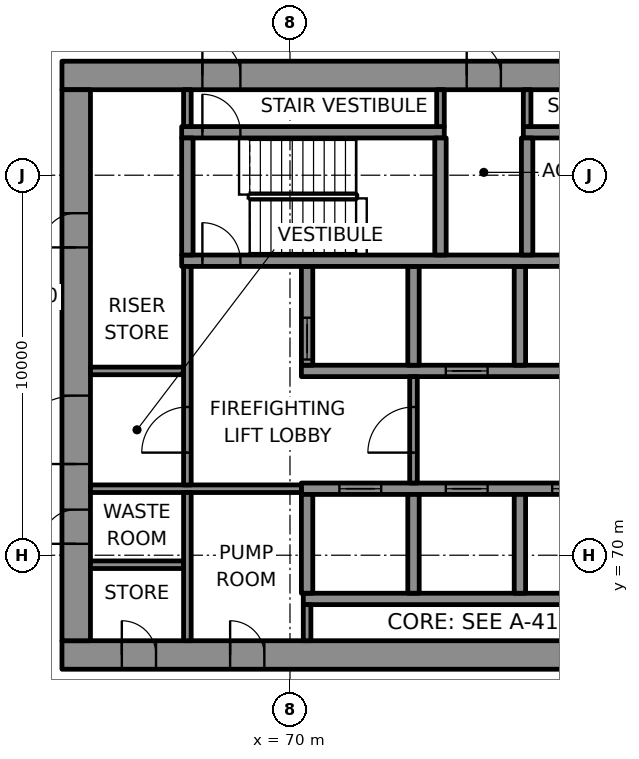
"""IFC4 building model, lengths in metres.
Left out: names, types, materials, properties, quantities, classifications, styles, units other than length and angle.
Written with IfcOpenShell. Run it as: python <this file> out.ifc"""

import sys

from ifc_helpers import new_model, si_unit, direction, frame, frame_2d, origin, place, context, subcontext, project, spatial, rectangle, extrude, element, fill, save


model = new_model("IFC4")
c1 = context("Model", 3, precision=1e-05, world=origin(), true_north=direction((0.0, 1.0)))
c2 = subcontext(c1, "Body", "Model", "MODEL_VIEW")
j1 = project(units=[si_unit("LENGTHUNIT", "METRE"), si_unit("PLANEANGLEUNIT", "RADIAN")], contexts=[c1])
p1 = place(None, origin())
s1 = spatial("IfcSite", under=j1, at=p1, CompositionType="ELEMENT")
p2 = place(p1, origin())
s2 = spatial("IfcBuilding", under=s1, at=p2, CompositionType="ELEMENT")
p3 = place(p2, frame((0.0, 0.0, 206.5)))
s3 = spatial("IfcBuildingStorey", under=s2, at=p3, CompositionType="ELEMENT", Elevation=206.5)
p4 = place(p3, frame((64.0, 67.375, 0.0), z_axis=(0.0, 0.0, 1.0), x_axis=(1.0, 0.0, 0.0)))
e1 = element("IfcWall", 1, at=p4, inside=s3, PredefinedType="SHEAR", context=c2, shape_type="SweptSolid", body=[
    extrude(rectangle(XDim=22.0, YDim=0.75, at=frame_2d((11.0, 0.0))), origin(), (0.0, 0.0, 1.0), 3.7),
])
p5 = place(p4, frame((1.575, 0.0, 0.0)))
e2 = element("IfcOpeningElement", 2, at=p5, cuts=e1, PredefinedType="OPENING", context=c2, shape_type="SweptSolid", body=[
    extrude(rectangle(XDim=0.9, YDim=2.1, at=frame_2d((0.45, 1.05))), frame((0.0, 0.385, 0.0), z_axis=(0.0, -1.0, 0.0), x_axis=(1.0, 0.0, 0.0)), (0.0, 0.0, 1.0), 0.77),
])
p6 = place(p4, frame((4.425, 0.0, 0.0)))
e3 = element("IfcOpeningElement", 3, at=p6, cuts=e1, PredefinedType="OPENING", context=c2, shape_type="SweptSolid", body=[
    extrude(rectangle(XDim=0.9, YDim=2.1, at=frame_2d((0.45, 1.05))), frame((0.0, 0.385, 0.0), z_axis=(0.0, -1.0, 0.0), x_axis=(1.0, 0.0, 0.0)), (0.0, 0.0, 1.0), 0.77),
])
p7 = place(p3, frame((64.0, 82.625, 0.0), z_axis=(0.0, 0.0, 1.0), x_axis=(1.0, 0.0, 0.0)))
e4 = element("IfcWall", 4, at=p7, inside=s3, PredefinedType="SHEAR", context=c2, shape_type="SweptSolid", body=[
    extrude(rectangle(XDim=22.0, YDim=0.75, at=frame_2d((11.0, 0.0))), origin(), (0.0, 0.0, 1.0), 3.7),
])
p8 = place(p7, frame((3.695, 0.0, 0.0)))
e5 = element("IfcOpeningElement", 5, at=p8, cuts=e4, PredefinedType="OPENING", context=c2, shape_type="SweptSolid", body=[
    extrude(rectangle(XDim=1.0, YDim=2.1, at=frame_2d((0.5, 1.05))), frame((0.0, 0.385, 0.0), z_axis=(0.0, -1.0, 0.0), x_axis=(1.0, 0.0, 0.0)), (0.0, 0.0, 1.0), 0.77),
])
p9 = place(p7, frame((17.505, 0.0, 0.0)))
e6 = element("IfcOpeningElement", 6, at=p9, cuts=e4, PredefinedType="OPENING", context=c2, shape_type="SweptSolid", body=[
    extrude(rectangle(XDim=1.0, YDim=2.1, at=frame_2d((0.5, 1.05))), frame((0.0, 0.385, 0.0), z_axis=(0.0, -1.0, 0.0), x_axis=(1.0, 0.0, 0.0)), (0.0, 0.0, 1.0), 0.77),
])
p10 = place(p7, frame((10.65, 0.0, 0.0)))
e7 = element("IfcOpeningElement", 7, at=p10, cuts=e4, PredefinedType="OPENING", context=c2, shape_type="SweptSolid", body=[
    extrude(rectangle(XDim=0.9, YDim=2.1, at=frame_2d((0.45, 1.05))), frame((0.0, 0.385, 0.0), z_axis=(0.0, -1.0, 0.0), x_axis=(1.0, 0.0, 0.0)), (0.0, 0.0, 1.0), 0.77),
])
p11 = place(p3, frame((64.375, 67.75, 0.0), z_axis=(0.0, 0.0, 1.0), x_axis=(0.0, 1.0, 0.0)))
e8 = element("IfcWall", 8, at=p11, inside=s3, PredefinedType="SHEAR", context=c2, shape_type="SweptSolid", body=[
    extrude(rectangle(XDim=14.5, YDim=0.75, at=frame_2d((7.25, 0.0))), origin(), (0.0, 0.0, 1.0), 3.7),
])
p12 = place(p11, frame((4.65, 0.0, 0.0)))
e9 = element("IfcOpeningElement", 9, at=p12, cuts=e8, PredefinedType="OPENING", context=c2, shape_type="SweptSolid", body=[
    extrude(rectangle(XDim=1.8, YDim=2.1, at=frame_2d((0.9, 1.05))), frame((0.0, 0.385, 0.0), z_axis=(0.0, -1.0, 0.0), x_axis=(1.0, 0.0, 0.0)), (0.0, 0.0, 1.0), 0.77),
])
p13 = place(p11, frame((2.55, 0.0, 0.0)))
e10 = element("IfcOpeningElement", 10, at=p13, cuts=e8, PredefinedType="OPENING", context=c2, shape_type="SweptSolid", body=[
    extrude(rectangle(XDim=0.9, YDim=2.1, at=frame_2d((0.45, 1.05))), frame((0.0, 0.385, 0.0), z_axis=(0.0, -1.0, 0.0), x_axis=(1.0, 0.0, 0.0)), (0.0, 0.0, 1.0), 0.77),
])
p14 = place(p11, frame((10.35, 0.0, 0.0)))
e11 = element("IfcOpeningElement", 11, at=p14, cuts=e8, PredefinedType="OPENING", context=c2, shape_type="SweptSolid", body=[
    extrude(rectangle(XDim=0.9, YDim=2.1, at=frame_2d((0.45, 1.05))), frame((0.0, 0.385, 0.0), z_axis=(0.0, -1.0, 0.0), x_axis=(1.0, 0.0, 0.0)), (0.0, 0.0, 1.0), 0.77),
])
p15 = place(p3, frame((70.35, 68.85, 0.0), z_axis=(0.0, 0.0, 1.0), x_axis=(1.0, 0.0, 0.0)))
e12 = element("IfcWall", 12, at=p15, inside=s3, PredefinedType="SHEAR", context=c2, shape_type="SweptSolid", body=[
    extrude(rectangle(XDim=14.2, YDim=0.3, at=frame_2d((7.1, 0.0))), origin(), (0.0, 0.0, 1.0), 3.7),
])
p16 = place(p3, frame((70.3, 71.75, 0.0), z_axis=(0.0, 0.0, 1.0), x_axis=(1.0, 0.0, 0.0)))
e13 = element("IfcWall", 13, at=p16, inside=s3, PredefinedType="SHEAR", context=c2, shape_type="SweptSolid", body=[
    extrude(rectangle(XDim=14.3, YDim=0.3, at=frame_2d((7.15, 0.0))), origin(), (0.0, 0.0, 1.0), 3.7),
])
p17 = place(p16, frame((1.0, 0.0, 0.0)))
e14 = element("IfcOpeningElement", 14, at=p17, cuts=e13, PredefinedType="OPENING", context=c2, shape_type="SweptSolid", body=[
    extrude(rectangle(XDim=1.1, YDim=2.1, at=frame_2d((0.55, 1.05))), frame((0.0, 0.16, 0.0), z_axis=(0.0, -1.0, 0.0), x_axis=(1.0, 0.0, 0.0)), (0.0, 0.0, 1.0), 0.32),
])
p18 = place(p16, frame((3.8, 0.0, 0.0)))
e15 = element("IfcOpeningElement", 15, at=p18, cuts=e13, PredefinedType="OPENING", context=c2, shape_type="SweptSolid", body=[
    extrude(rectangle(XDim=1.1, YDim=2.1, at=frame_2d((0.55, 1.05))), frame((0.0, 0.16, 0.0), z_axis=(0.0, -1.0, 0.0), x_axis=(1.0, 0.0, 0.0)), (0.0, 0.0, 1.0), 0.32),
])
p19 = place(p16, frame((6.6, 0.0, 0.0)))
e16 = element("IfcOpeningElement", 16, at=p19, cuts=e13, PredefinedType="OPENING", context=c2, shape_type="SweptSolid", body=[
    extrude(rectangle(XDim=1.1, YDim=2.1, at=frame_2d((0.55, 1.05))), frame((0.0, 0.16, 0.0), z_axis=(0.0, -1.0, 0.0), x_axis=(1.0, 0.0, 0.0)), (0.0, 0.0, 1.0), 0.32),
])
p20 = place(p16, frame((9.4, 0.0, 0.0)))
e17 = element("IfcOpeningElement", 17, at=p20, cuts=e13, PredefinedType="OPENING", context=c2, shape_type="SweptSolid", body=[
    extrude(rectangle(XDim=1.1, YDim=2.1, at=frame_2d((0.55, 1.05))), frame((0.0, 0.16, 0.0), z_axis=(0.0, -1.0, 0.0), x_axis=(1.0, 0.0, 0.0)), (0.0, 0.0, 1.0), 0.32),
])
p21 = place(p16, frame((12.2, 0.0, 0.0)))
e18 = element("IfcOpeningElement", 18, at=p21, cuts=e13, PredefinedType="OPENING", context=c2, shape_type="SweptSolid", body=[
    extrude(rectangle(XDim=1.1, YDim=2.1, at=frame_2d((0.55, 1.05))), frame((0.0, 0.16, 0.0), z_axis=(0.0, -1.0, 0.0), x_axis=(1.0, 0.0, 0.0)), (0.0, 0.0, 1.0), 0.32),
])
p22 = place(p3, frame((70.3, 74.85, 0.0), z_axis=(0.0, 0.0, 1.0), x_axis=(1.0, 0.0, 0.0)))
e19 = element("IfcWall", 19, at=p22, inside=s3, PredefinedType="SHEAR", context=c2, shape_type="SweptSolid", body=[
    extrude(rectangle(XDim=14.3, YDim=0.3, at=frame_2d((7.15, 0.0))), origin(), (0.0, 0.0, 1.0), 3.7),
])
p23 = place(p22, frame((3.8, 0.0, 0.0)))
e20 = element("IfcOpeningElement", 20, at=p23, cuts=e19, PredefinedType="OPENING", context=c2, shape_type="SweptSolid", body=[
    extrude(rectangle(XDim=1.1, YDim=2.1, at=frame_2d((0.55, 1.05))), frame((0.0, 0.16, 0.0), z_axis=(0.0, -1.0, 0.0), x_axis=(1.0, 0.0, 0.0)), (0.0, 0.0, 1.0), 0.32),
])
p24 = place(p22, frame((12.2, 0.0, 0.0)))
e21 = element("IfcOpeningElement", 21, at=p24, cuts=e19, PredefinedType="OPENING", context=c2, shape_type="SweptSolid", body=[
    extrude(rectangle(XDim=1.1, YDim=2.1, at=frame_2d((0.55, 1.05))), frame((0.0, 0.16, 0.0), z_axis=(0.0, -1.0, 0.0), x_axis=(1.0, 0.0, 0.0)), (0.0, 0.0, 1.0), 0.32),
])
p25 = place(p3, frame((70.45, 69.0, 0.0), z_axis=(0.0, 0.0, 1.0), x_axis=(0.0, 1.0, 0.0)))
e22 = element("IfcWall", 22, at=p25, inside=s3, PredefinedType="SHEAR", context=c2, shape_type="SweptSolid", body=[
    extrude(rectangle(XDim=2.6, YDim=0.3, at=frame_2d((1.3, 0.0))), origin(), (0.0, 0.0, 1.0), 3.7),
])
p26 = place(p3, frame((70.45, 75.0, 0.0), z_axis=(0.0, 0.0, 1.0), x_axis=(0.0, 1.0, 0.0)))
e23 = element("IfcWall", 23, at=p26, inside=s3, PredefinedType="SHEAR", context=c2, shape_type="SweptSolid", body=[
    extrude(rectangle(XDim=2.6, YDim=0.3, at=frame_2d((1.3, 0.0))), origin(), (0.0, 0.0, 1.0), 3.7),
])
p27 = place(p26, frame((0.15, 0.0, 0.0)))
e24 = element("IfcOpeningElement", 24, at=p27, cuts=e23, PredefinedType="OPENING", context=c2, shape_type="SweptSolid", body=[
    extrude(rectangle(XDim=1.1, YDim=2.1, at=frame_2d((0.55, 1.05))), frame((0.0, 0.16, 0.0), z_axis=(0.0, -1.0, 0.0), x_axis=(1.0, 0.0, 0.0)), (0.0, 0.0, 1.0), 0.32),
])
for number, where, z_axis, x_axis in (
    (25, (73.25, 69.0, 0.0), (0.0, 0.0, 1.0), (0.0, 1.0, 0.0)),
    (26, (73.25, 75.0, 0.0), (0.0, 0.0, 1.0), (0.0, 1.0, 0.0)),
    (27, (76.05, 69.0, 0.0), (0.0, 0.0, 1.0), (0.0, 1.0, 0.0)),
    (28, (76.05, 75.0, 0.0), (0.0, 0.0, 1.0), (0.0, 1.0, 0.0)),
):
    element("IfcWall", number, at=place(p3, frame(where, z_axis=z_axis, x_axis=x_axis)), inside=s3, PredefinedType="SHEAR", context=c2, shape_type="SweptSolid", body=[
        extrude(rectangle(XDim=2.6, YDim=0.3, at=frame_2d((1.3, 0.0))), origin(), (0.0, 0.0, 1.0), 3.7),
    ])
p28 = place(p3, frame((67.15, 77.75, 0.0), z_axis=(0.0, 0.0, 1.0), x_axis=(1.0, 0.0, 0.0)))
e29 = element("IfcWall", 29, at=p28, inside=s3, PredefinedType="SHEAR", context=c2, shape_type="SweptSolid", body=[
    extrude(rectangle(XDim=17.45, YDim=0.3, at=frame_2d((8.725, 0.0))), origin(), (0.0, 0.0, 1.0), 3.7),
])
p29 = place(p28, frame((0.545, 0.0, 0.0)))
e30 = element("IfcOpeningElement", 30, at=p29, cuts=e29, PredefinedType="OPENING", context=c2, shape_type="SweptSolid", body=[
    extrude(rectangle(XDim=1.0, YDim=2.1, at=frame_2d((0.5, 1.05))), frame((0.0, 0.16, 0.0), z_axis=(0.0, -1.0, 0.0), x_axis=(1.0, 0.0, 0.0)), (0.0, 0.0, 1.0), 0.32),
])
p30 = place(p3, frame((67.15, 81.13, 0.0), z_axis=(0.0, 0.0, 1.0), x_axis=(1.0, 0.0, 0.0)))
e31 = element("IfcWall", 31, at=p30, inside=s3, PredefinedType="SHEAR", context=c2, shape_type="SweptSolid", body=[
    extrude(rectangle(XDim=6.91, YDim=0.3, at=frame_2d((3.455, 0.0))), origin(), (0.0, 0.0, 1.0), 3.7),
])
p31 = place(p30, frame((0.545, 0.0, 0.0)))
e32 = element("IfcOpeningElement", 32, at=p31, cuts=e31, PredefinedType="OPENING", context=c2, shape_type="SweptSolid", body=[
    extrude(rectangle(XDim=1.0, YDim=2.1, at=frame_2d((0.5, 1.05))), frame((0.0, 0.16, 0.0), z_axis=(0.0, -1.0, 0.0), x_axis=(1.0, 0.0, 0.0)), (0.0, 0.0, 1.0), 0.32),
])
p32 = place(p3, frame((76.14, 81.13, 0.0), z_axis=(0.0, 0.0, 1.0), x_axis=(1.0, 0.0, 0.0)))
e33 = element("IfcWall", 33, at=p32, inside=s3, PredefinedType="SHEAR", context=c2, shape_type="SweptSolid", body=[
    extrude(rectangle(XDim=6.86, YDim=0.3, at=frame_2d((3.43, 0.0))), origin(), (0.0, 0.0, 1.0), 3.7),
])
p33 = place(p32, frame((5.365, 0.0, 0.0)))
e34 = element("IfcOpeningElement", 34, at=p33, cuts=e33, PredefinedType="OPENING", context=c2, shape_type="SweptSolid", body=[
    extrude(rectangle(XDim=1.0, YDim=2.1, at=frame_2d((0.5, 1.05))), frame((0.0, 0.16, 0.0), z_axis=(0.0, -1.0, 0.0), x_axis=(1.0, 0.0, 0.0)), (0.0, 0.0, 1.0), 0.32),
])
for number, where, z_axis, x_axis in (
    (35, (67.3, 77.9, 0.0), (0.0, 0.0, 1.0), (0.0, 1.0, 0.0)),
    (36, (73.96, 77.9, 0.0), (0.0, 0.0, 1.0), (0.0, 1.0, 0.0)),
    (37, (76.24, 77.9, 0.0), (0.0, 0.0, 1.0), (0.0, 1.0, 0.0)),
):
    element("IfcWall", number, at=place(p3, frame(where, z_axis=z_axis, x_axis=x_axis)), inside=s3, PredefinedType="SHEAR", context=c2, shape_type="SweptSolid", body=[
        extrude(rectangle(XDim=3.08, YDim=0.3, at=frame_2d((1.54, 0.0))), origin(), (0.0, 0.0, 1.0), 3.7),
    ])
p34 = place(p3, frame((64.75, 69.75, 0.0), z_axis=(0.0, 0.0, 1.0), x_axis=(1.0, 0.0, 0.0)))
e38 = element("IfcWall", 38, at=p34, inside=s3, PredefinedType="PARTITIONING", context=c2, shape_type="SweptSolid", body=[
    extrude(rectangle(XDim=2.45, YDim=0.2, at=frame_2d((1.225, 0.0))), origin(), (0.0, 0.0, 1.0), 3.7),
])
p35 = place(p3, frame((64.75, 71.75, 0.0), z_axis=(0.0, 0.0, 1.0), x_axis=(1.0, 0.0, 0.0)))
e39 = element("IfcWall", 39, at=p35, inside=s3, PredefinedType="PARTITIONING", context=c2, shape_type="SweptSolid", body=[
    extrude(rectangle(XDim=5.55, YDim=0.2, at=frame_2d((2.775, 0.0))), origin(), (0.0, 0.0, 1.0), 3.7),
])
p36 = place(p3, frame((64.75, 74.85, 0.0), z_axis=(0.0, 0.0, 1.0), x_axis=(1.0, 0.0, 0.0)))
e40 = element("IfcWall", 40, at=p36, inside=s3, PredefinedType="PARTITIONING", context=c2, shape_type="SweptSolid", body=[
    extrude(rectangle(XDim=2.45, YDim=0.2, at=frame_2d((1.225, 0.0))), origin(), (0.0, 0.0, 1.0), 3.7),
])
p37 = place(p3, frame((67.3, 67.75, 0.0), z_axis=(0.0, 0.0, 1.0), x_axis=(0.0, 1.0, 0.0)))
e41 = element("IfcWall", 41, at=p37, inside=s3, PredefinedType="PARTITIONING", context=c2, shape_type="SweptSolid", body=[
    extrude(rectangle(XDim=3.9, YDim=0.2, at=frame_2d((1.95, 0.0))), origin(), (0.0, 0.0, 1.0), 3.7),
])
p38 = place(p3, frame((67.3, 71.85, 0.0), z_axis=(0.0, 0.0, 1.0), x_axis=(0.0, 1.0, 0.0)))
e42 = element("IfcWall", 42, at=p38, inside=s3, PredefinedType="PARTITIONING", context=c2, shape_type="SweptSolid", body=[
    extrude(rectangle(XDim=5.75, YDim=0.2, at=frame_2d((2.875, 0.0))), origin(), (0.0, 0.0, 1.0), 3.7),
])
p39 = place(p38, frame((0.85, 0.0, 0.0)))
e43 = element("IfcOpeningElement", 43, at=p39, cuts=e42, PredefinedType="OPENING", context=c2, shape_type="SweptSolid", body=[
    extrude(rectangle(XDim=1.2, YDim=2.1, at=frame_2d((0.6, 1.05))), frame((0.0, 0.11, 0.0), z_axis=(0.0, -1.0, 0.0), x_axis=(1.0, 0.0, 0.0)), (0.0, 0.0, 1.0), 0.22),
])
p40 = place(p3, frame((67.3, 81.28, 0.0), z_axis=(0.0, 0.0, 1.0), x_axis=(0.0, 1.0, 0.0)))
e44 = element("IfcWall", 44, at=p40, inside=s3, PredefinedType="PARTITIONING", context=c2, shape_type="SweptSolid", body=[
    extrude(rectangle(XDim=0.97, YDim=0.2, at=frame_2d((0.485, 0.0))), origin(), (0.0, 0.0, 1.0), 3.7),
])
p41 = place(p3, frame((70.45, 67.75, 0.0), z_axis=(0.0, 0.0, 1.0), x_axis=(0.0, 1.0, 0.0)))
e45 = element("IfcWall", 45, at=p41, inside=s3, PredefinedType="PARTITIONING", context=c2, shape_type="SweptSolid", body=[
    extrude(rectangle(XDim=0.95, YDim=0.2, at=frame_2d((0.475, 0.0))), origin(), (0.0, 0.0, 1.0), 3.7),
])
p42 = place(p3, frame((73.25, 71.9, 0.0), z_axis=(0.0, 0.0, 1.0), x_axis=(0.0, 1.0, 0.0)))
e46 = element("IfcWall", 46, at=p42, inside=s3, PredefinedType="PARTITIONING", context=c2, shape_type="SweptSolid", body=[
    extrude(rectangle(XDim=2.8, YDim=0.2, at=frame_2d((1.4, 0.0))), origin(), (0.0, 0.0, 1.0), 3.7),
])
p43 = place(p42, frame((0.8, 0.0, 0.0)))
e47 = element("IfcOpeningElement", 47, at=p43, cuts=e46, PredefinedType="OPENING", context=c2, shape_type="SweptSolid", body=[
    extrude(rectangle(XDim=1.2, YDim=2.1, at=frame_2d((0.6, 1.05))), frame((0.0, 0.11, 0.0), z_axis=(0.0, -1.0, 0.0), x_axis=(1.0, 0.0, 0.0)), (0.0, 0.0, 1.0), 0.22),
])
for number, where, z_axis, x_axis in (
    (48, (73.96, 81.28, 0.0), (0.0, 0.0, 1.0), (0.0, 1.0, 0.0)),
    (49, (76.24, 81.28, 0.0), (0.0, 0.0, 1.0), (0.0, 1.0, 0.0)),
):
    element("IfcWall", number, at=place(p3, frame(where, z_axis=z_axis, x_axis=x_axis)), inside=s3, PredefinedType="PARTITIONING", context=c2, shape_type="SweptSolid", body=[
        extrude(rectangle(XDim=0.97, YDim=0.2, at=frame_2d((0.485, 0.0))), origin(), (0.0, 0.0, 1.0), 3.7),
    ])
p44 = place(p17, origin())
e50 = element("IfcDoor", 50, at=p44, inside=s3, OperationType="DOUBLE_DOOR_SLIDING", PredefinedType="DOOR", context=c2, shape_type="SweptSolid", body=[
    extrude(rectangle(XDim=1.1, YDim=2.1, at=frame_2d((0.55, 1.05))), frame((0.0, 0.025, 0.0), z_axis=(0.0, -1.0, 0.0), x_axis=(1.0, 0.0, 0.0)), (0.0, 0.0, 1.0), 0.05),
])
fill(e14, e50)
p45 = place(p18, origin())
e51 = element("IfcDoor", 51, at=p45, inside=s3, OperationType="DOUBLE_DOOR_SLIDING", PredefinedType="DOOR", context=c2, shape_type="SweptSolid", body=[
    extrude(rectangle(XDim=1.1, YDim=2.1, at=frame_2d((0.55, 1.05))), frame((0.0, 0.025, 0.0), z_axis=(0.0, -1.0, 0.0), x_axis=(1.0, 0.0, 0.0)), (0.0, 0.0, 1.0), 0.05),
])
fill(e15, e51)
p46 = place(p19, origin())
e52 = element("IfcDoor", 52, at=p46, inside=s3, OperationType="DOUBLE_DOOR_SLIDING", PredefinedType="DOOR", context=c2, shape_type="SweptSolid", body=[
    extrude(rectangle(XDim=1.1, YDim=2.1, at=frame_2d((0.55, 1.05))), frame((0.0, 0.025, 0.0), z_axis=(0.0, -1.0, 0.0), x_axis=(1.0, 0.0, 0.0)), (0.0, 0.0, 1.0), 0.05),
])
fill(e16, e52)
p47 = place(p27, origin())
e53 = element("IfcDoor", 53, at=p47, inside=s3, OperationType="DOUBLE_DOOR_SLIDING", PredefinedType="DOOR", context=c2, shape_type="SweptSolid", body=[
    extrude(rectangle(XDim=1.1, YDim=2.1, at=frame_2d((0.55, 1.05))), frame((0.0, 0.025, 0.0), z_axis=(0.0, -1.0, 0.0), x_axis=(1.0, 0.0, 0.0)), (0.0, 0.0, 1.0), 0.05),
])
fill(e24, e53)
p48 = place(p23, origin())
e54 = element("IfcDoor", 54, at=p48, inside=s3, OperationType="DOUBLE_DOOR_SLIDING", PredefinedType="DOOR", context=c2, shape_type="SweptSolid", body=[
    extrude(rectangle(XDim=1.1, YDim=2.1, at=frame_2d((0.55, 1.05))), frame((0.0, 0.025, 0.0), z_axis=(0.0, -1.0, 0.0), x_axis=(1.0, 0.0, 0.0)), (0.0, 0.0, 1.0), 0.05),
])
fill(e20, e54)
p49 = place(p29, origin())
e55 = element("IfcDoor", 55, at=p49, inside=s3, OperationType="SINGLE_SWING_LEFT", PredefinedType="DOOR", context=c2, shape_type="SweptSolid", body=[
    extrude(rectangle(XDim=1.0, YDim=2.1, at=frame_2d((0.5, 1.05))), frame((0.0, 0.025, 0.0), z_axis=(0.0, -1.0, 0.0), x_axis=(1.0, 0.0, 0.0)), (0.0, 0.0, 1.0), 0.05),
])
fill(e30, e55)
p50 = place(p31, origin())
e56 = element("IfcDoor", 56, at=p50, inside=s3, OperationType="SINGLE_SWING_RIGHT", PredefinedType="DOOR", context=c2, shape_type="SweptSolid", body=[
    extrude(rectangle(XDim=1.0, YDim=2.1, at=frame_2d((0.5, 1.05))), frame((0.0, 0.025, 0.0), z_axis=(0.0, -1.0, 0.0), x_axis=(1.0, 0.0, 0.0)), (0.0, 0.0, 1.0), 0.05),
])
fill(e32, e56)
p51 = place(p8, origin())
e57 = element("IfcDoor", 57, at=p51, inside=s3, OperationType="SINGLE_SWING_LEFT", PredefinedType="DOOR", context=c2, shape_type="SweptSolid", body=[
    extrude(rectangle(XDim=1.0, YDim=2.1, at=frame_2d((0.5, 1.05))), frame((0.0, 0.095, 0.0), z_axis=(0.0, -1.0, 0.0), x_axis=(1.0, 0.0, 0.0)), (0.0, 0.0, 1.0), 0.19),
])
fill(e5, e57)
p52 = place(p43, origin())
e58 = element("IfcDoor", 58, at=p52, inside=s3, OperationType="SINGLE_SWING_LEFT", PredefinedType="DOOR", context=c2, shape_type="SweptSolid", body=[
    extrude(rectangle(XDim=1.2, YDim=2.1, at=frame_2d((0.6, 1.05))), frame((0.0, 0.025, 0.0), z_axis=(0.0, -1.0, 0.0), x_axis=(1.0, 0.0, 0.0)), (0.0, 0.0, 1.0), 0.05),
])
fill(e47, e58)
p53 = place(p39, origin())
e59 = element("IfcDoor", 59, at=p53, inside=s3, OperationType="SINGLE_SWING_RIGHT", PredefinedType="DOOR", context=c2, shape_type="SweptSolid", body=[
    extrude(rectangle(XDim=1.2, YDim=2.1, at=frame_2d((0.6, 1.05))), frame((0.0, 0.025, 0.0), z_axis=(0.0, -1.0, 0.0), x_axis=(1.0, 0.0, 0.0)), (0.0, 0.0, 1.0), 0.05),
])
fill(e43, e59)
p54 = place(p12, origin())
e60 = element("IfcDoor", 60, at=p54, inside=s3, OperationType="SINGLE_SWING_LEFT", PredefinedType="DOOR", context=c2, shape_type="SweptSolid", body=[
    extrude(rectangle(XDim=1.8, YDim=2.1, at=frame_2d((0.9, 1.05))), frame((0.0, 0.095, 0.0), z_axis=(0.0, -1.0, 0.0), x_axis=(1.0, 0.0, 0.0)), (0.0, 0.0, 1.0), 0.19),
])
fill(e9, e60)
p55 = place(p5, origin())
e61 = element("IfcDoor", 61, at=p55, inside=s3, OperationType="SINGLE_SWING_LEFT", PredefinedType="DOOR", context=c2, shape_type="SweptSolid", body=[
    extrude(rectangle(XDim=0.9, YDim=2.1, at=frame_2d((0.45, 1.05))), frame((0.0, 0.095, 0.0), z_axis=(0.0, -1.0, 0.0), x_axis=(1.0, 0.0, 0.0)), (0.0, 0.0, 1.0), 0.19),
])
fill(e2, e61)
p56 = place(p13, origin())
e62 = element("IfcDoor", 62, at=p56, inside=s3, OperationType="SINGLE_SWING_RIGHT", PredefinedType="DOOR", context=c2, shape_type="SweptSolid", body=[
    extrude(rectangle(XDim=0.9, YDim=2.1, at=frame_2d((0.45, 1.05))), frame((0.0, 0.095, 0.0), z_axis=(0.0, -1.0, 0.0), x_axis=(1.0, 0.0, 0.0)), (0.0, 0.0, 1.0), 0.19),
])
fill(e10, e62)
p57 = place(p6, origin())
e63 = element("IfcDoor", 63, at=p57, inside=s3, OperationType="SINGLE_SWING_LEFT", PredefinedType="DOOR", context=c2, shape_type="SweptSolid", body=[
    extrude(rectangle(XDim=0.9, YDim=2.1, at=frame_2d((0.45, 1.05))), frame((0.0, 0.095, 0.0), z_axis=(0.0, -1.0, 0.0), x_axis=(1.0, 0.0, 0.0)), (0.0, 0.0, 1.0), 0.19),
])
fill(e3, e63)
p58 = place(p14, origin())
e64 = element("IfcDoor", 64, at=p58, inside=s3, OperationType="SINGLE_SWING_RIGHT", PredefinedType="DOOR", context=c2, shape_type="SweptSolid", body=[
    extrude(rectangle(XDim=0.9, YDim=2.1, at=frame_2d((0.45, 1.05))), frame((0.0, 0.095, 0.0), z_axis=(0.0, -1.0, 0.0), x_axis=(1.0, 0.0, 0.0)), (0.0, 0.0, 1.0), 0.19),
])
fill(e11, e64)
p59 = place(p10, origin())
e65 = element("IfcDoor", 65, at=p59, inside=s3, OperationType="SINGLE_SWING_LEFT", PredefinedType="DOOR", context=c2, shape_type="SweptSolid", body=[
    extrude(rectangle(XDim=0.9, YDim=2.1, at=frame_2d((0.45, 1.05))), frame((0.0, 0.095, 0.0), z_axis=(0.0, -1.0, 0.0), x_axis=(1.0, 0.0, 0.0)), (0.0, 0.0, 1.0), 0.19),
])
fill(e7, e65)
save(model, sys.argv[1])
